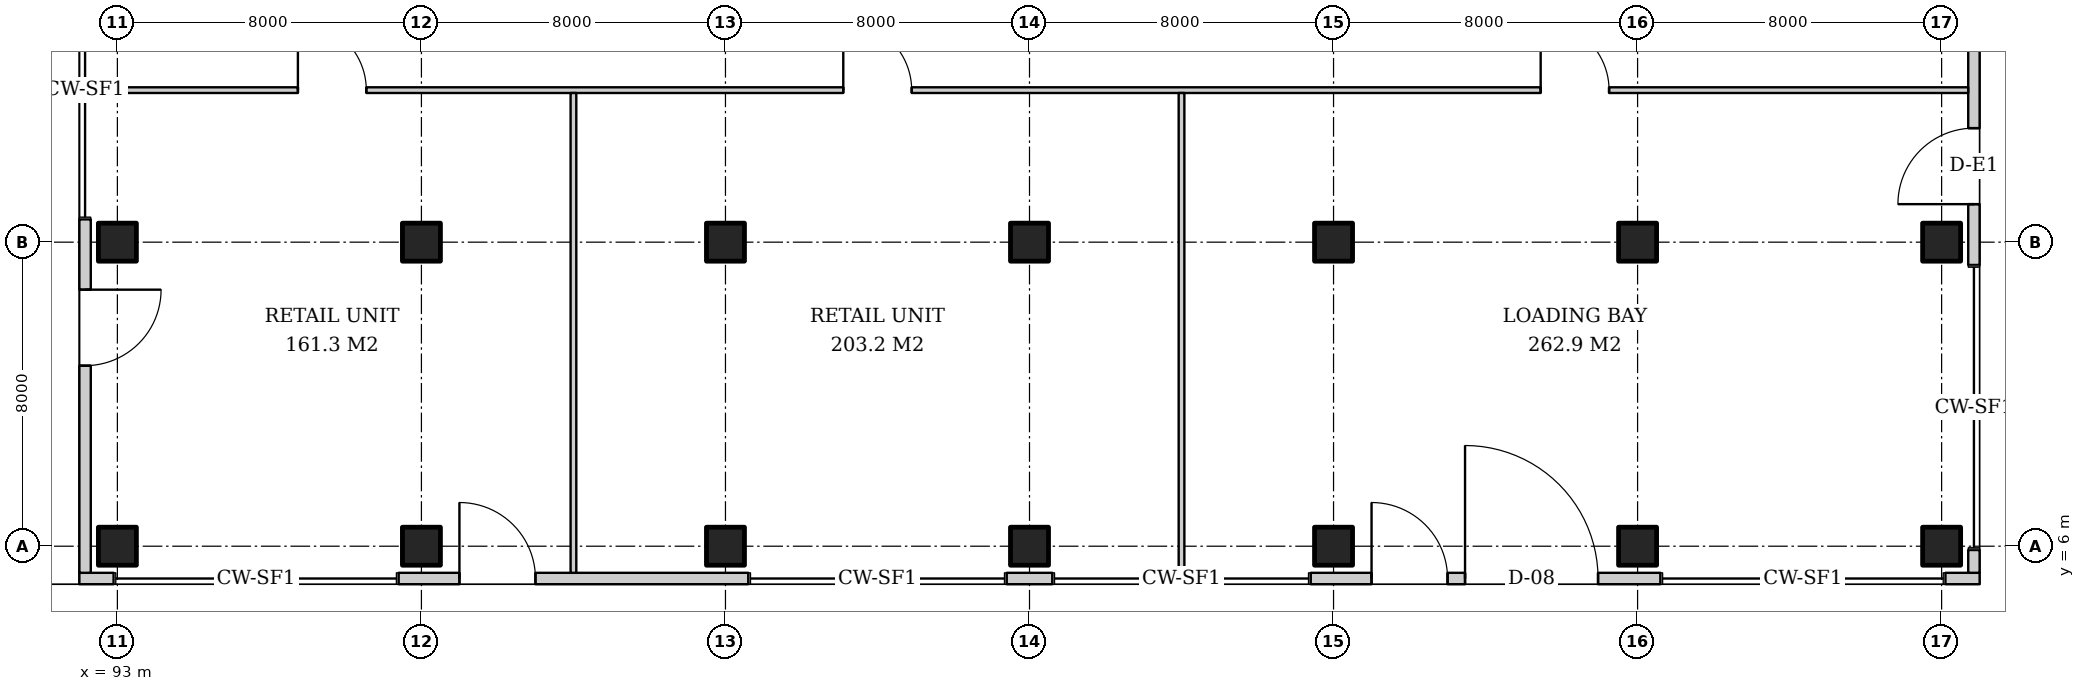
"""IFC4 building model, lengths in metres.
Left out: names, types, materials, properties, quantities, classifications, styles, units other than length and angle.
Written with IfcOpenShell. Run it as: python <this file> out.ifc"""

import sys

from ifc_helpers import new_model, si_unit, direction, frame, frame_2d, origin, origin_2d, place, context, subcontext, project, spatial, rectangle, extrude, element, fill, save


model = new_model("IFC4")
c1 = context("Model", 3, precision=1e-05, world=origin(), true_north=direction((0.0, 1.0)))
c2 = subcontext(c1, "Body", "Model", "MODEL_VIEW")
j1 = project(units=[si_unit("LENGTHUNIT", "METRE"), si_unit("PLANEANGLEUNIT", "RADIAN")], contexts=[c1])
p1 = place(None, origin())
s1 = spatial("IfcSite", under=j1, at=p1, CompositionType="ELEMENT")
p2 = place(p1, origin())
s2 = spatial("IfcBuilding", under=s1, at=p2, CompositionType="ELEMENT")
p3 = place(p2, origin())
s3 = spatial("IfcBuildingStorey", under=s2, at=p3, CompositionType="ELEMENT", Elevation=0.0)
for number, where, z_axis, x_axis in (
    (1, (93.0, 6.0, 0.0), (0.0, 0.0, 1.0), (1.0, 0.0, 0.0)),
    (2, (93.0, 14.0, 0.0), (0.0, 0.0, 1.0), (1.0, 0.0, 0.0)),
    (3, (101.0, 6.0, 0.0), (0.0, 0.0, 1.0), (1.0, 0.0, 0.0)),
    (4, (101.0, 14.0, 0.0), (0.0, 0.0, 1.0), (1.0, 0.0, 0.0)),
    (5, (109.0, 6.0, 0.0), (0.0, 0.0, 1.0), (1.0, 0.0, 0.0)),
    (6, (109.0, 14.0, 0.0), (0.0, 0.0, 1.0), (1.0, 0.0, 0.0)),
    (7, (117.0, 6.0, 0.0), (0.0, 0.0, 1.0), (1.0, 0.0, 0.0)),
    (8, (117.0, 14.0, 0.0), (0.0, 0.0, 1.0), (1.0, 0.0, 0.0)),
    (9, (125.0, 6.0, 0.0), (0.0, 0.0, 1.0), (1.0, 0.0, 0.0)),
    (10, (125.0, 14.0, 0.0), (0.0, 0.0, 1.0), (1.0, 0.0, 0.0)),
    (11, (133.0, 6.0, 0.0), (0.0, 0.0, 1.0), (1.0, 0.0, 0.0)),
    (12, (133.0, 14.0, 0.0), (0.0, 0.0, 1.0), (1.0, 0.0, 0.0)),
    (13, (141.0, 6.0, 0.0), (0.0, 0.0, 1.0), (1.0, 0.0, 0.0)),
    (14, (141.0, 14.0, 0.0), (0.0, 0.0, 1.0), (1.0, 0.0, 0.0)),
):
    element("IfcColumn", number, at=place(p3, frame(where, z_axis=z_axis, x_axis=x_axis)), inside=s3, PredefinedType="COLUMN", context=c2, shape_type="SweptSolid", body=[
        extrude(rectangle(XDim=1.0, YDim=1.0, at=origin_2d()), origin(), (0.0, 0.0, 1.0), 6.0),
    ])
p4 = place(p3, frame((92.0, 5.15, 0.0), z_axis=(0.0, 0.0, 1.0), x_axis=(1.0, 0.0, 0.0)))
e15 = element("IfcWall", 15, at=p4, inside=s3, PredefinedType="SOLIDWALL", context=c2, shape_type="SweptSolid", body=[
    extrude(rectangle(XDim=0.9, YDim=0.3, at=frame_2d((0.45, 0.0))), origin(), (0.0, 0.0, 1.0), 5.7),
])
p5 = place(p3, frame((100.4, 5.15, 0.0), z_axis=(0.0, 0.0, 1.0), x_axis=(1.0, 0.0, 0.0)))
e16 = element("IfcWall", 16, at=p5, inside=s3, PredefinedType="SOLIDWALL", context=c2, shape_type="SweptSolid", body=[
    extrude(rectangle(XDim=9.2, YDim=0.3, at=frame_2d((4.6, 0.0))), origin(), (0.0, 0.0, 1.0), 5.7),
])
p6 = place(p5, frame((1.6, 0.0, 0.0)))
e17 = element("IfcOpeningElement", 17, at=p6, cuts=e16, PredefinedType="OPENING", context=c2, shape_type="SweptSolid", body=[
    extrude(rectangle(XDim=2.0, YDim=2.7, at=frame_2d((1.0, 1.35))), frame((0.0, 0.16, 0.0), z_axis=(0.0, -1.0, 0.0), x_axis=(1.0, 0.0, 0.0)), (0.0, 0.0, 1.0), 0.32),
])
p7 = place(p3, frame((116.4, 5.15, 0.0), z_axis=(0.0, 0.0, 1.0), x_axis=(1.0, 0.0, 0.0)))
e18 = element("IfcWall", 18, at=p7, inside=s3, PredefinedType="SOLIDWALL", context=c2, shape_type="SweptSolid", body=[
    extrude(rectangle(XDim=1.2, YDim=0.3, at=frame_2d((0.6, 0.0))), origin(), (0.0, 0.0, 1.0), 5.7),
])
p8 = place(p3, frame((124.4, 5.15, 0.0), z_axis=(0.0, 0.0, 1.0), x_axis=(1.0, 0.0, 0.0)))
e19 = element("IfcWall", 19, at=p8, inside=s3, PredefinedType="SOLIDWALL", context=c2, shape_type="SweptSolid", body=[
    extrude(rectangle(XDim=9.2, YDim=0.3, at=frame_2d((4.6, 0.0))), origin(), (0.0, 0.0, 1.0), 5.7),
])
p9 = place(p8, frame((1.6, 0.0, 0.0)))
e20 = element("IfcOpeningElement", 20, at=p9, cuts=e19, PredefinedType="OPENING", context=c2, shape_type="SweptSolid", body=[
    extrude(rectangle(XDim=2.0, YDim=2.7, at=frame_2d((1.0, 1.35))), frame((0.0, 0.16, 0.0), z_axis=(0.0, -1.0, 0.0), x_axis=(1.0, 0.0, 0.0)), (0.0, 0.0, 1.0), 0.32),
])
p10 = place(p8, frame((4.06, 0.0, 0.0)))
e21 = element("IfcOpeningElement", 21, at=p10, cuts=e19, PredefinedType="OPENING", context=c2, shape_type="SweptSolid", body=[
    extrude(rectangle(XDim=3.5, YDim=4.5, at=frame_2d((1.75, 2.25))), frame((0.0, 0.16, 0.0), z_axis=(0.0, -1.0, 0.0), x_axis=(1.0, 0.0, 0.0)), (0.0, 0.0, 1.0), 0.32),
])
p11 = place(p3, frame((141.1, 5.15, 0.0), z_axis=(0.0, 0.0, 1.0), x_axis=(1.0, 0.0, 0.0)))
e22 = element("IfcWall", 22, at=p11, inside=s3, PredefinedType="SOLIDWALL", context=c2, shape_type="SweptSolid", body=[
    extrude(rectangle(XDim=0.9, YDim=0.3, at=frame_2d((0.45, 0.0))), origin(), (0.0, 0.0, 1.0), 5.7),
])
p12 = place(p3, frame((141.85, 5.3, 0.0), z_axis=(0.0, 0.0, 1.0), x_axis=(0.0, 1.0, 0.0)))
e23 = element("IfcWall", 23, at=p12, inside=s3, PredefinedType="SOLIDWALL", context=c2, shape_type="SweptSolid", body=[
    extrude(rectangle(XDim=0.6, YDim=0.3, at=frame_2d((0.3, 0.0))), origin(), (0.0, 0.0, 1.0), 5.7),
])
p13 = place(p3, frame((141.85, 13.4, 0.0), z_axis=(0.0, 0.0, 1.0), x_axis=(0.0, 1.0, 0.0)))
e24 = element("IfcWall", 24, at=p13, inside=s3, PredefinedType="SOLIDWALL", context=c2, shape_type="SweptSolid", body=[
    extrude(rectangle(XDim=9.2, YDim=0.3, at=frame_2d((4.6, 0.0))), origin(), (0.0, 0.0, 1.0), 5.7),
])
p14 = place(p13, frame((1.6, 0.0, 0.0)))
e25 = element("IfcOpeningElement", 25, at=p14, cuts=e24, PredefinedType="OPENING", context=c2, shape_type="SweptSolid", body=[
    extrude(rectangle(XDim=2.0, YDim=2.7, at=frame_2d((1.0, 1.35))), frame((0.0, 0.16, 0.0), z_axis=(0.0, -1.0, 0.0), x_axis=(1.0, 0.0, 0.0)), (0.0, 0.0, 1.0), 0.32),
])
p15 = place(p3, frame((92.15, 14.6, 0.0), z_axis=(0.0, 0.0, 1.0), x_axis=(0.0, -1.0, 0.0)))
e26 = element("IfcWall", 26, at=p15, inside=s3, PredefinedType="SOLIDWALL", context=c2, shape_type="SweptSolid", body=[
    extrude(rectangle(XDim=9.3, YDim=0.3, at=frame_2d((4.65, 0.0))), origin(), (0.0, 0.0, 1.0), 5.7),
])
p16 = place(p15, frame((1.85, 0.0, 0.0)))
e27 = element("IfcOpeningElement", 27, at=p16, cuts=e26, PredefinedType="OPENING", context=c2, shape_type="SweptSolid", body=[
    extrude(rectangle(XDim=2.0, YDim=2.7, at=frame_2d((1.0, 1.35))), frame((0.0, 0.16, 0.0), z_axis=(0.0, -1.0, 0.0), x_axis=(1.0, 0.0, 0.0)), (0.0, 0.0, 1.0), 0.32),
])
p17 = place(p3, frame((92.3, 18.0, 0.0), z_axis=(0.0, 0.0, 1.0), x_axis=(1.0, 0.0, 0.0)))
e28 = element("IfcWall", 28, at=p17, inside=s3, PredefinedType="PARTITIONING", context=c2, shape_type="SweptSolid", body=[
    extrude(rectangle(XDim=49.4, YDim=0.15, at=frame_2d((24.7, 0.0))), origin(), (0.0, 0.0, 1.0), 5.7),
])
p18 = place(p17, frame((5.45, 0.0, 0.0)))
e29 = element("IfcOpeningElement", 29, at=p18, cuts=e28, PredefinedType="OPENING", context=c2, shape_type="SweptSolid", body=[
    extrude(rectangle(XDim=1.8, YDim=2.4, at=frame_2d((0.9, 1.2))), frame((0.0, 0.085, 0.0), z_axis=(0.0, -1.0, 0.0), x_axis=(1.0, 0.0, 0.0)), (0.0, 0.0, 1.0), 0.17),
])
p19 = place(p17, frame((19.8, 0.0, 0.0)))
e30 = element("IfcOpeningElement", 30, at=p19, cuts=e28, PredefinedType="OPENING", context=c2, shape_type="SweptSolid", body=[
    extrude(rectangle(XDim=1.8, YDim=2.4, at=frame_2d((0.9, 1.2))), frame((0.0, 0.085, 0.0), z_axis=(0.0, -1.0, 0.0), x_axis=(1.0, 0.0, 0.0)), (0.0, 0.0, 1.0), 0.17),
])
p20 = place(p17, frame((38.15, 0.0, 0.0)))
e31 = element("IfcOpeningElement", 31, at=p20, cuts=e28, PredefinedType="OPENING", context=c2, shape_type="SweptSolid", body=[
    extrude(rectangle(XDim=1.8, YDim=2.4, at=frame_2d((0.9, 1.2))), frame((0.0, 0.085, 0.0), z_axis=(0.0, -1.0, 0.0), x_axis=(1.0, 0.0, 0.0)), (0.0, 0.0, 1.0), 0.17),
])
for number, where, z_axis, x_axis in (
    (32, (105.0, 17.925, 0.0), (0.0, 0.0, 1.0), (0.0, -1.0, 0.0)),
    (33, (121.0, 17.925, 0.0), (0.0, 0.0, 1.0), (0.0, -1.0, 0.0)),
):
    element("IfcWall", number, at=place(p3, frame(where, z_axis=z_axis, x_axis=x_axis)), inside=s3, PredefinedType="PARTITIONING", context=c2, shape_type="SweptSolid", body=[
        extrude(rectangle(XDim=12.625, YDim=0.15, at=frame_2d((6.312, 0.0))), origin(), (0.0, 0.0, 1.0), 4.2),
    ])
p21 = place(p6, origin())
e34 = element("IfcDoor", 34, at=p21, inside=s3, OperationType="DOUBLE_DOOR_SINGLE_SWING", PredefinedType="DOOR", context=c2, shape_type="SweptSolid", body=[
    extrude(rectangle(XDim=2.0, YDim=2.7, at=frame_2d((1.0, 1.35))), frame((0.0, 0.025, 0.0), z_axis=(0.0, -1.0, 0.0), x_axis=(1.0, 0.0, 0.0)), (0.0, 0.0, 1.0), 0.05),
])
fill(e17, e34)
p22 = place(p9, origin())
e35 = element("IfcDoor", 35, at=p22, inside=s3, OperationType="DOUBLE_DOOR_SINGLE_SWING", PredefinedType="DOOR", context=c2, shape_type="SweptSolid", body=[
    extrude(rectangle(XDim=2.0, YDim=2.7, at=frame_2d((1.0, 1.35))), frame((0.0, 0.025, 0.0), z_axis=(0.0, -1.0, 0.0), x_axis=(1.0, 0.0, 0.0)), (0.0, 0.0, 1.0), 0.05),
])
fill(e20, e35)
p23 = place(p14, origin())
e36 = element("IfcDoor", 36, at=p23, inside=s3, OperationType="DOUBLE_DOOR_SINGLE_SWING", PredefinedType="DOOR", context=c2, shape_type="SweptSolid", body=[
    extrude(rectangle(XDim=2.0, YDim=2.7, at=frame_2d((1.0, 1.35))), frame((0.0, 0.025, 0.0), z_axis=(0.0, -1.0, 0.0), x_axis=(1.0, 0.0, 0.0)), (0.0, 0.0, 1.0), 0.05),
])
fill(e25, e36)
p24 = place(p16, origin())
e37 = element("IfcDoor", 37, at=p24, inside=s3, OperationType="DOUBLE_DOOR_SINGLE_SWING", PredefinedType="DOOR", context=c2, shape_type="SweptSolid", body=[
    extrude(rectangle(XDim=2.0, YDim=2.7, at=frame_2d((1.0, 1.35))), frame((0.0, 0.025, 0.0), z_axis=(0.0, -1.0, 0.0), x_axis=(1.0, 0.0, 0.0)), (0.0, 0.0, 1.0), 0.05),
])
fill(e27, e37)
p25 = place(p18, origin())
e38 = element("IfcDoor", 38, at=p25, inside=s3, OperationType="DOUBLE_DOOR_SINGLE_SWING", PredefinedType="DOOR", context=c2, shape_type="SweptSolid", body=[
    extrude(rectangle(XDim=1.8, YDim=2.4, at=frame_2d((0.9, 1.2))), frame((0.0, 0.025, 0.0), z_axis=(0.0, -1.0, 0.0), x_axis=(1.0, 0.0, 0.0)), (0.0, 0.0, 1.0), 0.05),
])
fill(e29, e38)
p26 = place(p19, origin())
e39 = element("IfcDoor", 39, at=p26, inside=s3, OperationType="DOUBLE_DOOR_SINGLE_SWING", PredefinedType="DOOR", context=c2, shape_type="SweptSolid", body=[
    extrude(rectangle(XDim=1.8, YDim=2.4, at=frame_2d((0.9, 1.2))), frame((0.0, 0.025, 0.0), z_axis=(0.0, -1.0, 0.0), x_axis=(1.0, 0.0, 0.0)), (0.0, 0.0, 1.0), 0.05),
])
fill(e30, e39)
p27 = place(p20, origin())
e40 = element("IfcDoor", 40, at=p27, inside=s3, OperationType="DOUBLE_DOOR_SINGLE_SWING", PredefinedType="DOOR", context=c2, shape_type="SweptSolid", body=[
    extrude(rectangle(XDim=1.8, YDim=2.4, at=frame_2d((0.9, 1.2))), frame((0.0, 0.025, 0.0), z_axis=(0.0, -1.0, 0.0), x_axis=(1.0, 0.0, 0.0)), (0.0, 0.0, 1.0), 0.05),
])
fill(e31, e40)
p28 = place(p10, origin())
e41 = element("IfcDoor", 41, at=p28, inside=s3, OperationType="ROLLINGUP", PredefinedType="DOOR", context=c2, shape_type="SweptSolid", body=[
    extrude(rectangle(XDim=3.5, YDim=4.5, at=frame_2d((1.75, 2.25))), frame((0.0, 0.025, 0.0), z_axis=(0.0, -1.0, 0.0), x_axis=(1.0, 0.0, 0.0)), (0.0, 0.0, 1.0), 0.05),
])
fill(e21, e41)
save(model, sys.argv[1])
